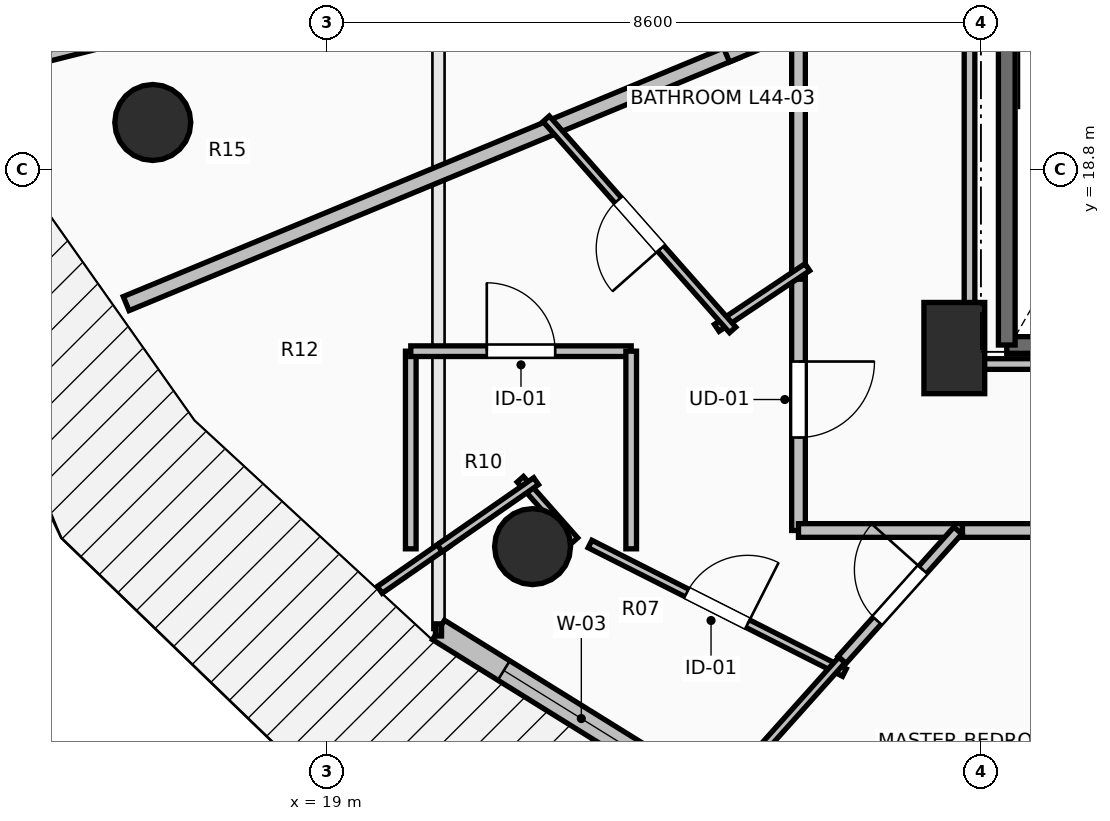
"""IFC4 building model, lengths in metres.
Left out: names, types, materials, properties, quantities, classifications, styles, units other than length and angle.
Written with IfcOpenShell. Run it as: python <this file> out.ifc"""

import sys

from ifc_helpers import new_model, si_unit, direction, frame, frame_2d, origin, origin_2d, place, context, subcontext, project, spatial, rectangle, circle, extrude, element, fill, save


model = new_model("IFC4")
c1 = context("Model", 3, precision=1e-05, world=origin(), true_north=direction((0.0, 1.0)))
c2 = subcontext(c1, "Body", "Model", "MODEL_VIEW")
j1 = project(units=[si_unit("LENGTHUNIT", "METRE"), si_unit("PLANEANGLEUNIT", "RADIAN")], contexts=[c1])
p1 = place(None, origin())
s1 = spatial("IfcSite", under=j1, at=p1, CompositionType="ELEMENT")
p2 = place(p1, origin())
s2 = spatial("IfcBuilding", under=s1, at=p2, CompositionType="ELEMENT")
p3 = place(p2, frame((0.0, 0.0, 164.1)))
s3 = spatial("IfcBuildingStorey", under=s2, at=p3, CompositionType="ELEMENT", Elevation=164.1)
for number, where, z_axis, x_axis in (
    (1, (16.705, 19.418, 0.0), (0.0, 0.0, 1.0), (-0.924, -0.383, 0.0)),
    (2, (21.701, 13.838, 0.0), (0.0, 0.0, 1.0), (-0.707, -0.707, 0.0)),
):
    element("IfcColumn", number, at=place(p3, frame(where, z_axis=z_axis, x_axis=x_axis)), inside=s3, PredefinedType="COLUMN", context=c2, shape_type="SweptSolid", body=[
        extrude(circle(Radius=0.5, at=origin_2d()), origin(), (0.0, 0.0, 1.0), 3.5),
    ])
p4 = place(p3, frame((27.25, 16.45, 0.0), z_axis=(0.0, 0.0, 1.0), x_axis=(1.0, 0.0, 0.0)))
e3 = element("IfcColumn", 3, at=p4, inside=s3, PredefinedType="PILASTER", context=c2, shape_type="SweptSolid", body=[
    extrude(rectangle(XDim=0.8, YDim=1.2, at=origin_2d()), origin(), (0.0, 0.0, 1.0), 3.5),
])
p5 = place(p3, frame((20.464, 12.742, 0.0), z_axis=(0.0, 0.0, 1.0), x_axis=(0.849721181976, -0.527232313977, 0.0)))
e4 = element("IfcWall", 4, at=p5, inside=s3, PredefinedType="STANDARD", context=c2, shape_type="SweptSolid", body=[
    extrude(rectangle(XDim=4.423, YDim=0.3, at=frame_2d((2.211, 0.0))), origin(), (0.0, 0.0, 1.0), 3.24),
])
p6 = place(p5, frame((1.011, 0.0, 0.85)))
e5 = element("IfcOpeningElement", 5, at=p6, cuts=e4, PredefinedType="OPENING", context=c2, shape_type="SweptSolid", body=[
    extrude(rectangle(XDim=2.4, YDim=2.19, at=frame_2d((1.2, 1.095))), frame((0.0, 0.165, 0.0), z_axis=(0.0, -1.0, 0.0), x_axis=(1.0, 0.0, 0.0)), (0.0, 0.0, 1.0), 0.33),
])
p7 = place(p3, frame((31.31, 16.49, 0.0), z_axis=(0.0, 0.0, 1.0), x_axis=(-1.0, 0.0, 0.0)))
e6 = element("IfcWall", 6, at=p7, inside=s3, PredefinedType="SOLIDWALL", context=c2, shape_type="SweptSolid", body=[
    extrude(rectangle(XDim=3.37, YDim=0.22, at=frame_2d((1.685, 0.0))), origin(), (0.0, 0.0, 1.0), 3.24),
])
p8 = place(p3, frame((27.94, 16.49, 0.0), z_axis=(0.0, 0.0, 1.0), x_axis=(0.0, 1.0, 0.0)))
e7 = element("IfcWall", 7, at=p8, inside=s3, PredefinedType="SOLIDWALL", context=c2, shape_type="SweptSolid", body=[
    extrude(rectangle(XDim=7.42, YDim=0.22, at=frame_2d((3.71, 0.0))), origin(), (0.0, 0.0, 1.0), 3.24),
])
p9 = place(p3, frame((25.2, 17.496, 0.0), z_axis=(0.0, 0.0, 1.0), x_axis=(0.0, -1.0, 0.0)))
e8 = element("IfcWall", 8, at=p9, inside=s3, PredefinedType="PARTITIONING", context=c2, shape_type="SweptSolid", body=[
    extrude(rectangle(XDim=3.446, YDim=0.18, at=frame_2d((1.723, 0.0))), origin(), (0.0, 0.0, 1.0), 2.432),
])
p10 = place(p9, frame((1.223, 0.0, 0.0)))
e9 = element("IfcOpeningElement", 9, at=p10, cuts=e8, PredefinedType="OPENING", context=c2, shape_type="SweptSolid", body=[
    extrude(rectangle(XDim=1.0, YDim=2.15, at=frame_2d((0.5, 1.075))), frame((0.0, 0.105, 0.0), z_axis=(0.0, -1.0, 0.0), x_axis=(1.0, 0.0, 0.0)), (0.0, 0.0, 1.0), 0.21),
])
p11 = place(p3, frame((25.2, 14.05, 0.0), z_axis=(0.0, 0.0, 1.0), x_axis=(1.0, 0.0, 0.0)))
e10 = element("IfcWall", 10, at=p11, inside=s3, PredefinedType="PARTITIONING", context=c2, shape_type="SweptSolid", body=[
    extrude(rectangle(XDim=2.157, YDim=0.18, at=frame_2d((1.079, 0.0))), origin(), (0.0, 0.0, 1.0), 2.886),
])
p12 = place(p3, frame((25.2, 20.773, 0.0), z_axis=(0.0, 0.0, 1.0), x_axis=(0.0, -1.0, 0.0)))
e11 = element("IfcWall", 11, at=p12, inside=s3, PredefinedType="PARTITIONING", context=c2, shape_type="SweptSolid", body=[
    extrude(rectangle(XDim=3.417, YDim=0.18, at=frame_2d((1.708, 0.0))), origin(), (0.0, 0.0, 1.0), 3.24),
])
p13 = place(p3, frame((27.357, 14.05, 0.0), z_axis=(0.0, 0.0, 1.0), x_axis=(1.0, 0.0, 0.0)))
e12 = element("IfcWall", 12, at=p13, inside=s3, PredefinedType="PARTITIONING", context=c2, shape_type="SweptSolid", body=[
    extrude(rectangle(XDim=4.376, YDim=0.18, at=frame_2d((2.188, 0.0))), origin(), (0.0, 0.0, 1.0), 2.432),
])
p14 = place(p3, frame((14.576, 20.103, 0.0), z_axis=(0.0, 0.0, 1.0), x_axis=(0.969732134757, 0.244171224389, 0.0)))
e13 = element("IfcWall", 13, at=p14, inside=s3, PredefinedType="PARTITIONING", context=c2, shape_type="SweptSolid", body=[
    extrude(rectangle(XDim=10.956, YDim=0.14, at=frame_2d((5.478, 0.0))), origin(), (0.0, 0.0, 1.0), 2.728),
])
p15 = place(p3, frame((16.355, 17.035, 0.0), z_axis=(0.0, 0.0, 1.0), x_axis=(0.923885339237, 0.382669413387, 0.0)))
e14 = element("IfcWall", 14, at=p15, inside=s3, PredefinedType="PARTITIONING", context=c2, shape_type="SweptSolid", body=[
    extrude(rectangle(XDim=8.689, YDim=0.2, at=frame_2d((4.345, 0.0))), origin(), (0.0, 0.0, 1.0), 2.432),
])
p16 = place(p3, frame((24.254, 20.306, 0.0), z_axis=(0.0, 0.0, 1.0), x_axis=(0.923789545328, 0.382900608439, 0.0)))
e15 = element("IfcWall", 15, at=p16, inside=s3, PredefinedType="PARTITIONING", context=c2, shape_type="SweptSolid", body=[
    extrude(rectangle(XDim=1.021, YDim=0.2, at=frame_2d((0.511, 0.0))), origin(), (0.0, 0.0, 1.0), 3.24),
])
p17 = place(p3, frame((25.316, 17.514, 0.0), z_axis=(0.0, 0.0, 1.0), x_axis=(-0.830948636418, -0.556349138253, 0.0)))
e16 = element("IfcWall", 16, at=p17, inside=s3, PredefinedType="PARTITIONING", context=c2, shape_type="SweptSolid", body=[
    extrude(rectangle(XDim=1.434, YDim=0.11, at=frame_2d((0.717, 0.0))), origin(), (0.0, 0.0, 1.0), 2.432),
])
p18 = place(p3, frame((24.334, 16.689, 0.0), z_axis=(0.0, 0.0, 1.0), x_axis=(-0.662140147261, 0.749380027346, 0.0)))
e17 = element("IfcWall", 17, at=p18, inside=s3, PredefinedType="PARTITIONING", context=c2, shape_type="SweptSolid", body=[
    extrude(rectangle(XDim=3.705, YDim=0.11, at=frame_2d((1.853, 0.0))), origin(), (0.0, 0.0, 1.0), 2.432),
])
p19 = place(p18, frame((1.428, 0.0, 0.0)))
e18 = element("IfcOpeningElement", 18, at=p19, cuts=e17, PredefinedType="OPENING", context=c2, shape_type="SweptSolid", body=[
    extrude(rectangle(XDim=0.85, YDim=2.1, at=frame_2d((0.425, 1.05))), frame((0.0, 0.07, 0.0), z_axis=(0.0, -1.0, 0.0), x_axis=(1.0, 0.0, 0.0)), (0.0, 0.0, 1.0), 0.14),
])
p20 = place(p3, frame((22.457, 13.872, 0.0), z_axis=(0.0, 0.0, 1.0), x_axis=(0.892531160695, -0.450985728364, 0.0)))
e19 = element("IfcWall", 19, at=p20, inside=s3, PredefinedType="PARTITIONING", context=c2, shape_type="SweptSolid", body=[
    extrude(rectangle(XDim=3.75, YDim=0.11, at=frame_2d((1.875, 0.0))), origin(), (0.0, 0.0, 1.0), 3.24),
])
p21 = place(p20, frame((1.425, 0.0, 0.0)))
e20 = element("IfcOpeningElement", 20, at=p21, cuts=e19, PredefinedType="OPENING", context=c2, shape_type="SweptSolid", body=[
    extrude(rectangle(XDim=0.9, YDim=2.1, at=frame_2d((0.45, 1.05))), frame((0.0, 0.07, 0.0), z_axis=(0.0, -1.0, 0.0), x_axis=(1.0, 0.0, 0.0)), (0.0, 0.0, 1.0), 0.14),
])
p22 = place(p3, frame((25.772, 12.348, 0.0), z_axis=(0.0, 0.0, 1.0), x_axis=(-0.667094551448, -0.744973059532, 0.0)))
e21 = element("IfcWall", 21, at=p22, inside=s3, PredefinedType="PARTITIONING", context=c2, shape_type="SweptSolid", body=[
    extrude(rectangle(XDim=2.643, YDim=0.11, at=frame_2d((1.321, 0.0))), origin(), (0.0, 0.0, 1.0), 2.728),
])
p23 = place(p3, frame((19.691, 13.269, 0.0), z_axis=(0.0, 0.0, 1.0), x_axis=(0.821239462259, 0.57058368854, 0.0)))
e22 = element("IfcWall", 22, at=p23, inside=s3, PredefinedType="PARTITIONING", context=c2, shape_type="SweptSolid", body=[
    extrude(rectangle(XDim=1.071, YDim=0.11, at=frame_2d((0.536, 0.0))), origin(), (0.0, 0.0, 1.0), 3.24),
])
p24 = place(p3, frame((20.099, 13.809, 0.0), z_axis=(0.0, 0.0, 1.0), x_axis=(0.0, 1.0, 0.0)))
e23 = element("IfcWall", 23, at=p24, inside=s3, PredefinedType="PARTITIONING", context=c2, shape_type="SweptSolid", body=[
    extrude(rectangle(XDim=2.6, YDim=0.14, at=frame_2d((1.3, 0.0))), origin(), (0.0, 0.0, 1.0), 2.728),
])
p25 = place(p3, frame((20.099, 16.409, 0.0), z_axis=(0.0, 0.0, 1.0), x_axis=(1.0, 0.0, 0.0)))
e24 = element("IfcWall", 24, at=p25, inside=s3, PredefinedType="PARTITIONING", context=c2, shape_type="SweptSolid", body=[
    extrude(rectangle(XDim=2.9, YDim=0.14, at=frame_2d((1.45, 0.0))), origin(), (0.0, 0.0, 1.0), 2.886),
])
p26 = place(p25, frame((1.0, 0.0, 0.0)))
e25 = element("IfcOpeningElement", 25, at=p26, cuts=e24, PredefinedType="OPENING", context=c2, shape_type="SweptSolid", body=[
    extrude(rectangle(XDim=0.9, YDim=2.1, at=frame_2d((0.45, 1.05))), frame((0.0, 0.085, 0.0), z_axis=(0.0, -1.0, 0.0), x_axis=(1.0, 0.0, 0.0)), (0.0, 0.0, 1.0), 0.17),
])
p27 = place(p3, frame((22.999, 16.409, 0.0), z_axis=(0.0, 0.0, 1.0), x_axis=(0.0, -1.0, 0.0)))
e26 = element("IfcWall", 26, at=p27, inside=s3, PredefinedType="PARTITIONING", context=c2, shape_type="SweptSolid", body=[
    extrude(rectangle(XDim=2.6, YDim=0.14, at=frame_2d((1.3, 0.0))), origin(), (0.0, 0.0, 1.0), 2.432),
])
p28 = place(p3, frame((25.773, 12.348, 0.0), z_axis=(0.0, 0.0, 1.0), x_axis=(0.667197684579, 0.744880694939, 0.0)))
e27 = element("IfcWall", 27, at=p28, inside=s3, PredefinedType="PARTITIONING", context=c2, shape_type="SweptSolid", body=[
    extrude(rectangle(XDim=2.285, YDim=0.14, at=frame_2d((1.143, 0.0))), origin(), (0.0, 0.0, 1.0), 2.886),
])
p29 = place(p28, frame((0.692, 0.0, 0.0)))
e28 = element("IfcOpeningElement", 28, at=p29, cuts=e27, PredefinedType="OPENING", context=c2, shape_type="SweptSolid", body=[
    extrude(rectangle(XDim=0.9, YDim=2.1, at=frame_2d((0.45, 1.05))), frame((0.0, 0.085, 0.0), z_axis=(0.0, -1.0, 0.0), x_axis=(1.0, 0.0, 0.0)), (0.0, 0.0, 1.0), 0.17),
])
p30 = place(p3, frame((22.254, 13.917, 0.0), z_axis=(0.0, 0.0, 1.0), x_axis=(-0.662363540736, 0.749182581154, 0.0)))
e29 = element("IfcWall", 29, at=p30, inside=s3, PredefinedType="PARTITIONING", context=c2, shape_type="SweptSolid", body=[
    extrude(rectangle(XDim=1.077, YDim=0.11, at=frame_2d((0.539, 0.0))), origin(), (0.0, 0.0, 1.0), 2.432),
])
p31 = place(p3, frame((21.748, 14.699, 0.0), z_axis=(0.0, 0.0, 1.0), x_axis=(-0.821040550937, -0.570869874592, 0.0)))
e30 = element("IfcWall", 30, at=p31, inside=s3, PredefinedType="PARTITIONING", context=c2, shape_type="SweptSolid", body=[
    extrude(rectangle(XDim=1.544, YDim=0.11, at=frame_2d((0.772, 0.0))), origin(), (0.0, 0.0, 1.0), 2.728),
])
p32 = place(p3, frame((27.45, 23.754, 0.0), z_axis=(0.0, 0.0, 1.0), x_axis=(0.0, -1.0, 0.0)))
e31 = element("IfcWall", 31, at=p32, inside=s3, PredefinedType="PARTITIONING", context=c2, shape_type="SweptSolid", body=[
    extrude(rectangle(XDim=7.514, YDim=0.14, at=frame_2d((3.757, 0.0))), origin(), (0.0, 0.0, 1.0), 2.432),
])
p33 = place(p3, frame((27.45, 16.24, 0.0), z_axis=(0.0, 0.0, 1.0), x_axis=(1.0, 0.0, 0.0)))
e32 = element("IfcWall", 32, at=p33, inside=s3, PredefinedType="PARTITIONING", context=c2, shape_type="SweptSolid", body=[
    extrude(rectangle(XDim=3.745, YDim=0.14, at=frame_2d((1.873, 0.0))), origin(), (0.0, 0.0, 1.0), 2.432),
])
p34 = place(p6, origin())
e33 = element("IfcWindow", 33, at=p34, inside=s3, PartitioningType="SINGLE_PANEL", PredefinedType="WINDOW", context=c2, shape_type="SweptSolid", body=[
    extrude(rectangle(XDim=2.4, YDim=2.19, at=frame_2d((1.2, 1.095))), frame((0.0, 0.03, 0.0), z_axis=(0.0, -1.0, 0.0), x_axis=(1.0, 0.0, 0.0)), (0.0, 0.0, 1.0), 0.06),
])
fill(e5, e33)
p35 = place(p10, origin())
e34 = element("IfcDoor", 34, at=p35, inside=s3, OperationType="SINGLE_SWING_LEFT", PredefinedType="DOOR", context=c2, shape_type="SweptSolid", body=[
    extrude(rectangle(XDim=1.0, YDim=2.15, at=frame_2d((0.5, 1.075))), frame((0.0, 0.025, 0.0), z_axis=(0.0, -1.0, 0.0), x_axis=(1.0, 0.0, 0.0)), (0.0, 0.0, 1.0), 0.05),
])
fill(e9, e34)
p36 = place(p19, origin())
e35 = element("IfcDoor", 35, at=p36, inside=s3, OperationType="SINGLE_SWING_LEFT", PredefinedType="DOOR", context=c2, shape_type="SweptSolid", body=[
    extrude(rectangle(XDim=0.85, YDim=2.1, at=frame_2d((0.425, 1.05))), frame((0.0, 0.025, 0.0), z_axis=(0.0, -1.0, 0.0), x_axis=(1.0, 0.0, 0.0)), (0.0, 0.0, 1.0), 0.05),
])
fill(e18, e35)
p37 = place(p21, origin())
e36 = element("IfcDoor", 36, at=p37, inside=s3, OperationType="SINGLE_SWING_RIGHT", PredefinedType="DOOR", context=c2, shape_type="SweptSolid", body=[
    extrude(rectangle(XDim=0.9, YDim=2.1, at=frame_2d((0.45, 1.05))), frame((0.0, 0.025, 0.0), z_axis=(0.0, -1.0, 0.0), x_axis=(1.0, 0.0, 0.0)), (0.0, 0.0, 1.0), 0.05),
])
fill(e20, e36)
p38 = place(p26, origin())
e37 = element("IfcDoor", 37, at=p38, inside=s3, OperationType="SINGLE_SWING_LEFT", PredefinedType="DOOR", context=c2, shape_type="SweptSolid", body=[
    extrude(rectangle(XDim=0.9, YDim=2.1, at=frame_2d((0.45, 1.05))), frame((0.0, 0.025, 0.0), z_axis=(0.0, -1.0, 0.0), x_axis=(1.0, 0.0, 0.0)), (0.0, 0.0, 1.0), 0.05),
])
fill(e25, e37)
p39 = place(p29, origin())
e38 = element("IfcDoor", 38, at=p39, inside=s3, OperationType="SINGLE_SWING_RIGHT", PredefinedType="DOOR", context=c2, shape_type="SweptSolid", body=[
    extrude(rectangle(XDim=0.9, YDim=2.1, at=frame_2d((0.45, 1.05))), frame((0.0, 0.025, 0.0), z_axis=(0.0, -1.0, 0.0), x_axis=(1.0, 0.0, 0.0)), (0.0, 0.0, 1.0), 0.05),
])
fill(e28, e38)
save(model, sys.argv[1])
